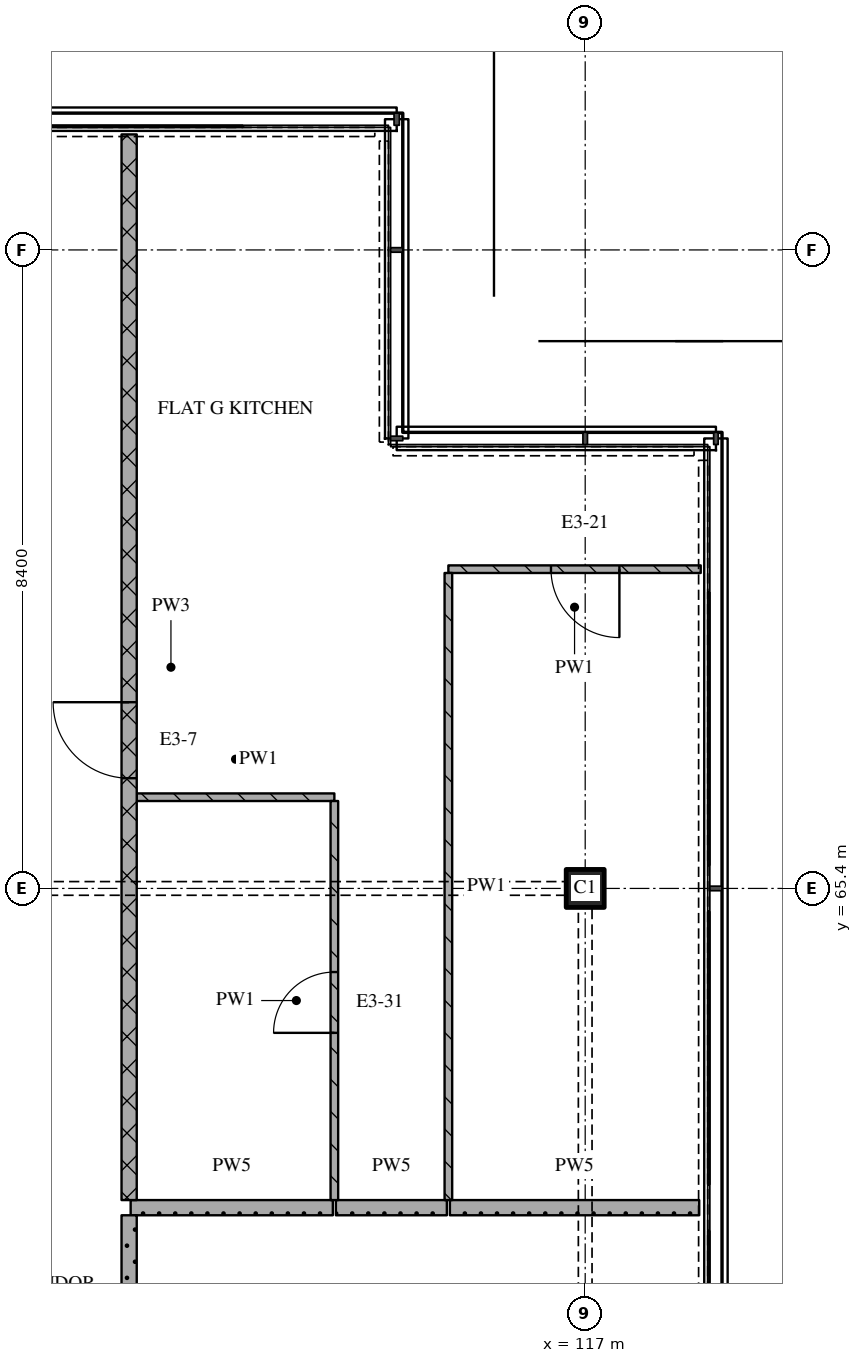
"""IFC4 building model, lengths in metres.
Left out: names, types, materials, properties, quantities, classifications, styles, units other than length and angle.
Written with IfcOpenShell. Run it as: python <this file> out.ifc"""

import sys

from ifc_helpers import new_model, si_unit, direction, frame, frame_2d, origin, origin_2d, place, context, subcontext, project, spatial, rectangle, extrude, element, fill, save


model = new_model("IFC4")
c1 = context("Model", 3, precision=1e-05, world=origin(), true_north=direction((0.0, 1.0)))
c2 = subcontext(c1, "Body", "Model", "MODEL_VIEW")
j1 = project(units=[si_unit("LENGTHUNIT", "METRE"), si_unit("PLANEANGLEUNIT", "RADIAN")], contexts=[c1])
p1 = place(None, origin())
s1 = spatial("IfcSite", under=j1, at=p1, CompositionType="ELEMENT")
p2 = place(p1, origin())
s2 = spatial("IfcBuilding", under=s1, at=p2, CompositionType="ELEMENT")
p3 = place(p2, frame((0.0, 0.0, 281.55)))
s3 = spatial("IfcBuildingStorey", under=s2, at=p3, CompositionType="ELEMENT", Elevation=281.55)
p4 = place(p3, frame((117.0, 65.4, 0.0), z_axis=(0.0, 0.0, 1.0), x_axis=(1.0, 0.0, 0.0)))
e1 = element("IfcColumn", 1, at=p4, inside=s3, PredefinedType="COLUMN", context=c2, shape_type="SweptSolid", body=[
    extrude(rectangle(XDim=0.5, YDim=0.5, at=origin_2d()), origin(), (0.0, 0.0, 1.0), 3.6),
])
p5 = place(p3, frame((111.02, 61.2, 0.0), z_axis=(0.0, 0.0, 1.0), x_axis=(1.0, 0.0, 0.0)))
e2 = element("IfcWall", 2, at=p5, inside=s3, PredefinedType="PARTITIONING", context=c2, shape_type="SweptSolid", body=[
    extrude(rectangle(XDim=2.66, YDim=0.2, at=frame_2d((1.33, 0.0))), origin(), (0.0, 0.0, 1.0), 3.32),
])
p6 = place(p3, frame((113.72, 61.2, 0.0), z_axis=(0.0, 0.0, 1.0), x_axis=(1.0, 0.0, 0.0)))
e3 = element("IfcWall", 3, at=p6, inside=s3, PredefinedType="PARTITIONING", context=c2, shape_type="SweptSolid", body=[
    extrude(rectangle(XDim=1.46, YDim=0.2, at=frame_2d((0.73, 0.0))), origin(), (0.0, 0.0, 1.0), 3.32),
])
p7 = place(p3, frame((115.22, 61.2, 0.0), z_axis=(0.0, 0.0, 1.0), x_axis=(1.0, 0.0, 0.0)))
e4 = element("IfcWall", 4, at=p7, inside=s3, PredefinedType="PARTITIONING", context=c2, shape_type="SweptSolid", body=[
    extrude(rectangle(XDim=3.28, YDim=0.2, at=frame_2d((1.64, 0.0))), origin(), (0.0, 0.0, 1.0), 3.32),
])
p8 = place(p3, frame((111.1, 66.6, 0.0), z_axis=(0.0, 0.0, 1.0), x_axis=(1.0, 0.0, 0.0)))
e5 = element("IfcWall", 5, at=p8, inside=s3, PredefinedType="PARTITIONING", context=c2, shape_type="SweptSolid", body=[
    extrude(rectangle(XDim=2.6, YDim=0.1, at=frame_2d((1.3, 0.0))), origin(), (0.0, 0.0, 1.0), 3.32),
])
p9 = place(p3, frame((118.52, 69.6, 0.0), z_axis=(0.0, 0.0, 1.0), x_axis=(-1.0, 0.0, 0.0)))
e6 = element("IfcWall", 6, at=p9, inside=s3, PredefinedType="PARTITIONING", context=c2, shape_type="SweptSolid", body=[
    extrude(rectangle(XDim=3.32, YDim=0.1, at=frame_2d((1.66, 0.0))), origin(), (0.0, 0.0, 1.0), 3.32),
])
p10 = place(p9, frame((1.07, 0.0, 0.0)))
e7 = element("IfcOpeningElement", 7, at=p10, cuts=e6, PredefinedType="OPENING", context=c2, shape_type="SweptSolid", body=[
    extrude(rectangle(XDim=0.9, YDim=2.1, at=frame_2d((0.45, 1.05))), frame((0.0, 0.06, 0.0), z_axis=(0.0, -1.0, 0.0), x_axis=(1.0, 0.0, 0.0)), (0.0, 0.0, 1.0), 0.12),
])
p11 = place(p3, frame((111.0, 75.32, 0.0), z_axis=(0.0, 0.0, 1.0), x_axis=(0.0, -1.0, 0.0)))
e8 = element("IfcWall", 8, at=p11, inside=s3, PredefinedType="PARTITIONING", context=c2, shape_type="SweptSolid", body=[
    extrude(rectangle(XDim=14.02, YDim=0.2, at=frame_2d((7.01, 0.0))), origin(), (0.0, 0.0, 1.0), 3.32),
])
p12 = place(p11, frame((7.47, 0.0, 0.0)))
e9 = element("IfcOpeningElement", 9, at=p12, cuts=e8, PredefinedType="OPENING", context=c2, shape_type="SweptSolid", body=[
    extrude(rectangle(XDim=1.0, YDim=2.1, at=frame_2d((0.5, 1.05))), frame((0.0, 0.11, 0.0), z_axis=(0.0, -1.0, 0.0), x_axis=(1.0, 0.0, 0.0)), (0.0, 0.0, 1.0), 0.22),
])
p13 = place(p3, frame((111.0, 61.1, 0.0), z_axis=(0.0, 0.0, 1.0), x_axis=(0.0, -1.0, 0.0)))
e10 = element("IfcWall", 10, at=p13, inside=s3, PredefinedType="PARTITIONING", context=c2, shape_type="SweptSolid", body=[
    extrude(rectangle(XDim=2.2, YDim=0.2, at=frame_2d((1.1, 0.0))), origin(), (0.0, 0.0, 1.0), 3.32),
])
p14 = place(p3, frame((113.7, 61.3, 0.0), z_axis=(0.0, 0.0, 1.0), x_axis=(0.0, 1.0, 0.0)))
e11 = element("IfcWall", 11, at=p14, inside=s3, PredefinedType="PARTITIONING", context=c2, shape_type="SweptSolid", body=[
    extrude(rectangle(XDim=5.25, YDim=0.1, at=frame_2d((2.625, 0.0))), origin(), (0.0, 0.0, 1.0), 3.32),
])
p15 = place(p14, frame((2.2, 0.0, 0.0)))
e12 = element("IfcOpeningElement", 12, at=p15, cuts=e11, PredefinedType="OPENING", context=c2, shape_type="SweptSolid", body=[
    extrude(rectangle(XDim=0.8, YDim=2.1, at=frame_2d((0.4, 1.05))), frame((0.0, 0.06, 0.0), z_axis=(0.0, -1.0, 0.0), x_axis=(1.0, 0.0, 0.0)), (0.0, 0.0, 1.0), 0.12),
])
p16 = place(p3, frame((115.2, 69.55, 0.0), z_axis=(0.0, 0.0, 1.0), x_axis=(0.0, -1.0, 0.0)))
e13 = element("IfcWall", 13, at=p16, inside=s3, PredefinedType="PARTITIONING", context=c2, shape_type="SweptSolid", body=[
    extrude(rectangle(XDim=8.25, YDim=0.1, at=frame_2d((4.125, 0.0))), origin(), (0.0, 0.0, 1.0), 3.32),
])
p17 = place(p10, origin())
e14 = element("IfcDoor", 14, at=p17, inside=s3, OperationType="SINGLE_SWING_LEFT", PredefinedType="DOOR", context=c2, shape_type="SweptSolid", body=[
    extrude(rectangle(XDim=0.9, YDim=2.1, at=frame_2d((0.45, 1.05))), frame((0.0, 0.025, 0.0), z_axis=(0.0, -1.0, 0.0), x_axis=(1.0, 0.0, 0.0)), (0.0, 0.0, 1.0), 0.05),
])
fill(e7, e14)
p18 = place(p12, origin())
e15 = element("IfcDoor", 15, at=p18, inside=s3, OperationType="SINGLE_SWING_RIGHT", PredefinedType="DOOR", context=c2, shape_type="SweptSolid", body=[
    extrude(rectangle(XDim=1.0, YDim=2.1, at=frame_2d((0.5, 1.05))), frame((0.0, 0.025, 0.0), z_axis=(0.0, -1.0, 0.0), x_axis=(1.0, 0.0, 0.0)), (0.0, 0.0, 1.0), 0.05),
])
fill(e9, e15)
p19 = place(p15, origin())
e16 = element("IfcDoor", 16, at=p19, inside=s3, OperationType="SINGLE_SWING_LEFT", PredefinedType="DOOR", context=c2, shape_type="SweptSolid", body=[
    extrude(rectangle(XDim=0.8, YDim=2.1, at=frame_2d((0.4, 1.05))), frame((0.0, 0.025, 0.0), z_axis=(0.0, -1.0, 0.0), x_axis=(1.0, 0.0, 0.0)), (0.0, 0.0, 1.0), 0.05),
])
fill(e12, e16)
save(model, sys.argv[1])
